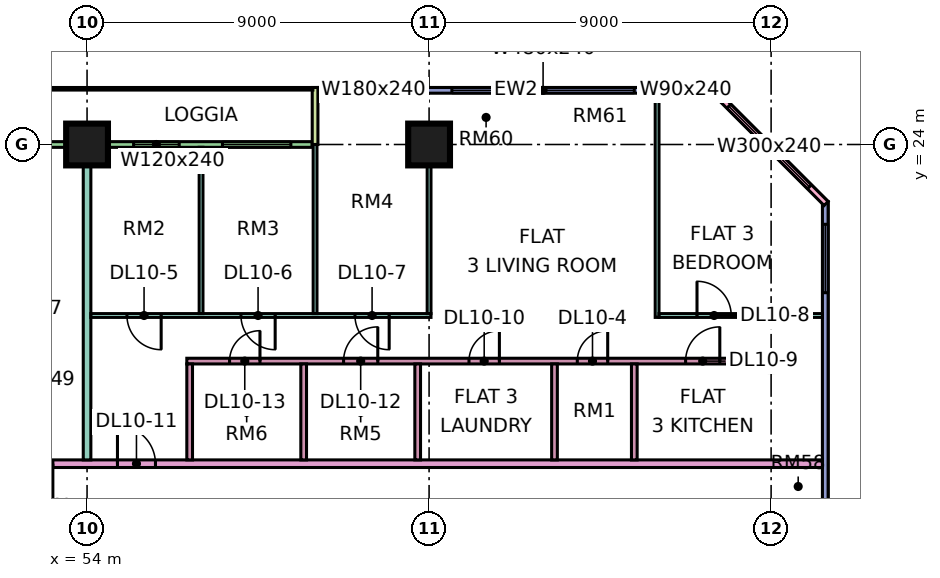
"""IFC4 building model, lengths in metres.
Left out: names, types, materials, properties, quantities, classifications, styles, units other than length and angle.
Written with IfcOpenShell. Run it as: python <this file> out.ifc"""

import sys

from ifc_helpers import new_model, si_unit, direction, frame, frame_2d, origin, origin_2d, place, context, subcontext, project, spatial, rectangle, extrude, element, fill, save


model = new_model("IFC4")
c1 = context("Model", 3, precision=1e-05, world=origin(), true_north=direction((0.0, 1.0)))
c2 = subcontext(c1, "Body", "Model", "MODEL_VIEW")
j1 = project(units=[si_unit("LENGTHUNIT", "METRE"), si_unit("PLANEANGLEUNIT", "RADIAN")], contexts=[c1])
p1 = place(None, origin())
s1 = spatial("IfcSite", under=j1, at=p1, CompositionType="ELEMENT")
p2 = place(p1, origin())
s2 = spatial("IfcBuilding", under=s1, at=p2, CompositionType="ELEMENT")
p3 = place(p2, frame((0.0, 0.0, 52.65)))
s3 = spatial("IfcBuildingStorey", under=s2, at=p3, CompositionType="ELEMENT", Elevation=52.65)
for number, where, z_axis, x_axis in (
    (1, (54.0, 24.0, 0.0), (0.0, 0.0, 1.0), (1.0, 0.0, 0.0)),
    (2, (63.0, 24.0, 0.0), (0.0, 0.0, 1.0), (1.0, 0.0, 0.0)),
):
    element("IfcColumn", number, at=place(p3, frame(where, z_axis=z_axis, x_axis=x_axis)), inside=s3, PredefinedType="COLUMN", context=c2, shape_type="SweptSolid", body=[
        extrude(rectangle(XDim=1.1, YDim=1.1, at=origin_2d()), origin(), (0.0, 0.0, 1.0), 3.75),
    ])
p4 = place(p3, frame((70.5, 25.425, 0.0), z_axis=(0.0, 0.0, 1.0), x_axis=(-1.0, 0.0, 0.0)))
e3 = element("IfcWall", 3, at=p4, inside=s3, PredefinedType="SOLIDWALL", context=c2, shape_type="SweptSolid", body=[
    extrude(rectangle(XDim=10.425, YDim=0.15, at=frame_2d((5.212, 0.0))), origin(), (0.0, 0.0, 1.0), 3.35),
])
p5 = place(p4, frame((0.3, 0.0, 0.45)))
e4 = element("IfcOpeningElement", 4, at=p5, cuts=e3, PredefinedType="OPENING", context=c2, shape_type="SweptSolid", body=[
    extrude(rectangle(XDim=0.9, YDim=2.4, at=frame_2d((0.45, 1.2))), frame((0.0, 0.085, 0.0), z_axis=(0.0, -1.0, 0.0), x_axis=(1.0, 0.0, 0.0)), (0.0, 0.0, 1.0), 0.17),
])
p6 = place(p4, frame((2.1, 0.0, 0.45)))
e5 = element("IfcOpeningElement", 5, at=p6, cuts=e3, PredefinedType="OPENING", context=c2, shape_type="SweptSolid", body=[
    extrude(rectangle(XDim=4.8, YDim=2.4, at=frame_2d((2.4, 1.2))), frame((0.0, 0.085, 0.0), z_axis=(0.0, -1.0, 0.0), x_axis=(1.0, 0.0, 0.0)), (0.0, 0.0, 1.0), 0.17),
])
p7 = place(p4, frame((8.062, 0.0, 0.45)))
e6 = element("IfcOpeningElement", 6, at=p7, cuts=e3, PredefinedType="OPENING", context=c2, shape_type="SweptSolid", body=[
    extrude(rectangle(XDim=1.8, YDim=2.4, at=frame_2d((0.9, 1.2))), frame((0.0, 0.085, 0.0), z_axis=(0.0, -1.0, 0.0), x_axis=(1.0, 0.0, 0.0)), (0.0, 0.0, 1.0), 0.17),
])
p8 = place(p3, frame((59.925, 24.0, 0.0), z_axis=(0.0, 0.0, 1.0), x_axis=(-1.0, 0.0, 0.0)))
e7 = element("IfcWall", 7, at=p8, inside=s3, PredefinedType="SOLIDWALL", context=c2, shape_type="SweptSolid", body=[
    extrude(rectangle(XDim=11.85, YDim=0.15, at=frame_2d((5.925, 0.0))), origin(), (0.0, 0.0, 1.0), 3.35),
])
p9 = place(p8, frame((0.562, 0.0, 0.45)))
e8 = element("IfcOpeningElement", 8, at=p9, cuts=e7, PredefinedType="OPENING", context=c2, shape_type="SweptSolid", body=[
    extrude(rectangle(XDim=1.8, YDim=2.4, at=frame_2d((0.9, 1.2))), frame((0.0, 0.085, 0.0), z_axis=(0.0, -1.0, 0.0), x_axis=(1.0, 0.0, 0.0)), (0.0, 0.0, 1.0), 0.17),
])
p10 = place(p8, frame((3.5, 0.0, 0.45)))
e9 = element("IfcOpeningElement", 9, at=p10, cuts=e7, PredefinedType="OPENING", context=c2, shape_type="SweptSolid", body=[
    extrude(rectangle(XDim=1.2, YDim=2.4, at=frame_2d((0.6, 1.2))), frame((0.0, 0.085, 0.0), z_axis=(0.0, -1.0, 0.0), x_axis=(1.0, 0.0, 0.0)), (0.0, 0.0, 1.0), 0.17),
])
p11 = place(p8, frame((7.113, 0.0, 0.45)))
e10 = element("IfcOpeningElement", 10, at=p11, cuts=e7, PredefinedType="OPENING", context=c2, shape_type="SweptSolid", body=[
    extrude(rectangle(XDim=4.2, YDim=2.4, at=frame_2d((2.1, 1.2))), frame((0.0, 0.085, 0.0), z_axis=(0.0, -1.0, 0.0), x_axis=(1.0, 0.0, 0.0)), (0.0, 0.0, 1.0), 0.17),
])
p12 = place(p3, frame((60.0, 25.5, 0.0), z_axis=(0.0, 0.0, 1.0), x_axis=(0.0, -1.0, 0.0)))
e11 = element("IfcWall", 11, at=p12, inside=s3, PredefinedType="SOLIDWALL", context=c2, shape_type="SweptSolid", body=[
    extrude(rectangle(XDim=1.5, YDim=0.15, at=frame_2d((0.75, 0.0))), origin(), (0.0, 0.0, 1.0), 3.35),
])
p13 = place(p3, frame((73.425, 12.075, 0.0), z_axis=(0.0, 0.0, 1.0), x_axis=(0.0, 1.0, 0.0)))
e12 = element("IfcWall", 12, at=p13, inside=s3, PredefinedType="SOLIDWALL", context=c2, shape_type="SweptSolid", body=[
    extrude(rectangle(XDim=10.425, YDim=0.15, at=frame_2d((5.212, 0.0))), origin(), (0.0, 0.0, 1.0), 3.35),
])
p14 = place(p13, frame((8.025, 0.0, 0.45)))
e13 = element("IfcOpeningElement", 13, at=p14, cuts=e12, PredefinedType="OPENING", context=c2, shape_type="SweptSolid", body=[
    extrude(rectangle(XDim=1.8, YDim=2.4, at=frame_2d((0.9, 1.2))), frame((0.0, 0.085, 0.0), z_axis=(0.0, -1.0, 0.0), x_axis=(1.0, 0.0, 0.0)), (0.0, 0.0, 1.0), 0.17),
])
p15 = place(p3, frame((73.447, 22.447, 0.0), z_axis=(0.0, 0.0, 1.0), x_axis=(-0.707106781187, 0.707106781187, 0.0)))
e14 = element("IfcWall", 14, at=p15, inside=s3, PredefinedType="SOLIDWALL", context=c2, shape_type="SweptSolid", body=[
    extrude(rectangle(XDim=4.243, YDim=0.15, at=frame_2d((2.121, 0.0))), origin(), (0.0, 0.0, 1.0), 3.35),
])
p16 = place(p15, frame((0.621, 0.0, 0.45)))
e15 = element("IfcOpeningElement", 15, at=p16, cuts=e14, PredefinedType="OPENING", context=c2, shape_type="SweptSolid", body=[
    extrude(rectangle(XDim=3.0, YDim=2.4, at=frame_2d((1.5, 1.2))), frame((0.0, 0.085, 0.0), z_axis=(0.0, -1.0, 0.0), x_axis=(1.0, 0.0, 0.0)), (0.0, 0.0, 1.0), 0.17),
])
p17 = place(p3, frame((51.225, 15.6, 0.0), z_axis=(0.0, 0.0, 1.0), x_axis=(1.0, 0.0, 0.0)))
e16 = element("IfcWall", 16, at=p17, inside=s3, PredefinedType="PARTITIONING", context=c2, shape_type="SweptSolid", body=[
    extrude(rectangle(XDim=22.125, YDim=0.2, at=frame_2d((11.062, 0.0))), origin(), (0.0, 0.0, 1.0), 3.35),
])
p18 = place(p17, frame((3.575, 0.0, 0.0)))
e17 = element("IfcOpeningElement", 17, at=p18, cuts=e16, PredefinedType="OPENING", context=c2, shape_type="SweptSolid", body=[
    extrude(rectangle(XDim=1.0, YDim=2.1, at=frame_2d((0.5, 1.05))), frame((0.0, 0.11, 0.0), z_axis=(0.0, -1.0, 0.0), x_axis=(1.0, 0.0, 0.0)), (0.0, 0.0, 1.0), 0.22),
])
p19 = place(p17, frame((0.875, 0.0, 0.0)))
e18 = element("IfcOpeningElement", 18, at=p19, cuts=e16, PredefinedType="OPENING", context=c2, shape_type="SweptSolid", body=[
    extrude(rectangle(XDim=1.0, YDim=2.1, at=frame_2d((0.5, 1.05))), frame((0.0, 0.11, 0.0), z_axis=(0.0, -1.0, 0.0), x_axis=(1.0, 0.0, 0.0)), (0.0, 0.0, 1.0), 0.22),
])
p20 = place(p3, frame((54.0, 15.7, 0.0), z_axis=(0.0, 0.0, 1.0), x_axis=(0.0, 1.0, 0.0)))
e19 = element("IfcWall", 19, at=p20, inside=s3, PredefinedType="PARTITIONING", context=c2, shape_type="SweptSolid", body=[
    extrude(rectangle(XDim=8.226, YDim=0.2, at=frame_2d((4.113, 0.0))), origin(), (0.0, 0.0, 1.0), 3.35),
])
p21 = place(p3, frame((54.1, 19.5, 0.0), z_axis=(0.0, 0.0, 1.0), x_axis=(1.0, 0.0, 0.0)))
e20 = element("IfcWall", 20, at=p21, inside=s3, PredefinedType="PARTITIONING", context=c2, shape_type="SweptSolid", body=[
    extrude(rectangle(XDim=8.95, YDim=0.1, at=frame_2d((4.475, 0.0))), origin(), (0.0, 0.0, 1.0), 3.35),
])
p22 = place(p21, frame((0.95, 0.0, 0.0)))
e21 = element("IfcOpeningElement", 21, at=p22, cuts=e20, PredefinedType="OPENING", context=c2, shape_type="SweptSolid", body=[
    extrude(rectangle(XDim=0.9, YDim=2.1, at=frame_2d((0.45, 1.05))), frame((0.0, 0.06, 0.0), z_axis=(0.0, -1.0, 0.0), x_axis=(1.0, 0.0, 0.0)), (0.0, 0.0, 1.0), 0.12),
])
p23 = place(p21, frame((3.95, 0.0, 0.0)))
e22 = element("IfcOpeningElement", 22, at=p23, cuts=e20, PredefinedType="OPENING", context=c2, shape_type="SweptSolid", body=[
    extrude(rectangle(XDim=0.9, YDim=2.1, at=frame_2d((0.45, 1.05))), frame((0.0, 0.06, 0.0), z_axis=(0.0, -1.0, 0.0), x_axis=(1.0, 0.0, 0.0)), (0.0, 0.0, 1.0), 0.12),
])
p24 = place(p21, frame((6.95, 0.0, 0.0)))
e23 = element("IfcOpeningElement", 23, at=p24, cuts=e20, PredefinedType="OPENING", context=c2, shape_type="SweptSolid", body=[
    extrude(rectangle(XDim=0.9, YDim=2.1, at=frame_2d((0.45, 1.05))), frame((0.0, 0.06, 0.0), z_axis=(0.0, -1.0, 0.0), x_axis=(1.0, 0.0, 0.0)), (0.0, 0.0, 1.0), 0.12),
])
p25 = place(p3, frame((56.625, 18.3, 0.0), z_axis=(0.0, 0.0, 1.0), x_axis=(1.0, 0.0, 0.0)))
e24 = element("IfcWall", 24, at=p25, inside=s3, PredefinedType="PARTITIONING", context=c2, shape_type="SweptSolid", body=[
    extrude(rectangle(XDim=15.425, YDim=0.15, at=frame_2d((7.712, 0.0))), origin(), (0.0, 0.0, 1.0), 3.35),
])
p26 = place(p25, frame((10.275, 0.0, 0.0)))
e25 = element("IfcOpeningElement", 25, at=p26, cuts=e24, PredefinedType="OPENING", context=c2, shape_type="SweptSolid", body=[
    extrude(rectangle(XDim=0.8, YDim=2.1, at=frame_2d((0.4, 1.05))), frame((0.0, 0.085, 0.0), z_axis=(0.0, -1.0, 0.0), x_axis=(1.0, 0.0, 0.0)), (0.0, 0.0, 1.0), 0.17),
])
p27 = place(p25, frame((13.125, 0.0, 0.0)))
e26 = element("IfcOpeningElement", 26, at=p27, cuts=e24, PredefinedType="OPENING", context=c2, shape_type="SweptSolid", body=[
    extrude(rectangle(XDim=0.9, YDim=2.1, at=frame_2d((0.45, 1.05))), frame((0.0, 0.085, 0.0), z_axis=(0.0, -1.0, 0.0), x_axis=(1.0, 0.0, 0.0)), (0.0, 0.0, 1.0), 0.17),
])
p28 = place(p25, frame((7.425, 0.0, 0.0)))
e27 = element("IfcOpeningElement", 27, at=p28, cuts=e24, PredefinedType="OPENING", context=c2, shape_type="SweptSolid", body=[
    extrude(rectangle(XDim=0.8, YDim=2.1, at=frame_2d((0.4, 1.05))), frame((0.0, 0.085, 0.0), z_axis=(0.0, -1.0, 0.0), x_axis=(1.0, 0.0, 0.0)), (0.0, 0.0, 1.0), 0.17),
])
p29 = place(p25, frame((4.125, 0.0, 0.0)))
e28 = element("IfcOpeningElement", 28, at=p29, cuts=e24, PredefinedType="OPENING", context=c2, shape_type="SweptSolid", body=[
    extrude(rectangle(XDim=0.9, YDim=2.1, at=frame_2d((0.45, 1.05))), frame((0.0, 0.085, 0.0), z_axis=(0.0, -1.0, 0.0), x_axis=(1.0, 0.0, 0.0)), (0.0, 0.0, 1.0), 0.17),
])
p30 = place(p25, frame((1.125, 0.0, 0.0)))
e29 = element("IfcOpeningElement", 29, at=p30, cuts=e24, PredefinedType="OPENING", context=c2, shape_type="SweptSolid", body=[
    extrude(rectangle(XDim=0.8, YDim=2.1, at=frame_2d((0.4, 1.05))), frame((0.0, 0.085, 0.0), z_axis=(0.0, -1.0, 0.0), x_axis=(1.0, 0.0, 0.0)), (0.0, 0.0, 1.0), 0.17),
])
p31 = place(p3, frame((56.7, 15.7, 0.0), z_axis=(0.0, 0.0, 1.0), x_axis=(0.0, 1.0, 0.0)))
e30 = element("IfcWall", 30, at=p31, inside=s3, PredefinedType="PARTITIONING", context=c2, shape_type="SweptSolid", body=[
    extrude(rectangle(XDim=2.525, YDim=0.15, at=frame_2d((1.263, 0.0))), origin(), (0.0, 0.0, 1.0), 3.35),
])
p32 = place(p3, frame((57.0, 19.55, 0.0), z_axis=(0.0, 0.0, 1.0), x_axis=(0.0, 1.0, 0.0)))
e31 = element("IfcWall", 31, at=p32, inside=s3, PredefinedType="PARTITIONING", context=c2, shape_type="SweptSolid", body=[
    extrude(rectangle(XDim=4.376, YDim=0.1, at=frame_2d((2.188, 0.0))), origin(), (0.0, 0.0, 1.0), 3.35),
])
p33 = place(p3, frame((59.7, 15.7, 0.0), z_axis=(0.0, 0.0, 1.0), x_axis=(0.0, 1.0, 0.0)))
e32 = element("IfcWall", 32, at=p33, inside=s3, PredefinedType="PARTITIONING", context=c2, shape_type="SweptSolid", body=[
    extrude(rectangle(XDim=2.525, YDim=0.15, at=frame_2d((1.263, 0.0))), origin(), (0.0, 0.0, 1.0), 3.35),
])
p34 = place(p3, frame((60.0, 19.55, 0.0), z_axis=(0.0, 0.0, 1.0), x_axis=(0.0, 1.0, 0.0)))
e33 = element("IfcWall", 33, at=p34, inside=s3, PredefinedType="PARTITIONING", context=c2, shape_type="SweptSolid", body=[
    extrude(rectangle(XDim=4.45, YDim=0.1, at=frame_2d((2.225, 0.0))), origin(), (0.0, 0.0, 1.0), 3.35),
])
p35 = place(p3, frame((62.7, 15.7, 0.0), z_axis=(0.0, 0.0, 1.0), x_axis=(0.0, 1.0, 0.0)))
e34 = element("IfcWall", 34, at=p35, inside=s3, PredefinedType="PARTITIONING", context=c2, shape_type="SweptSolid", body=[
    extrude(rectangle(XDim=2.525, YDim=0.15, at=frame_2d((1.263, 0.0))), origin(), (0.0, 0.0, 1.0), 3.35),
])
p36 = place(p3, frame((63.0, 19.55, 0.0), z_axis=(0.0, 0.0, 1.0), x_axis=(0.0, 1.0, 0.0)))
e35 = element("IfcWall", 35, at=p36, inside=s3, PredefinedType="PARTITIONING", context=c2, shape_type="SweptSolid", body=[
    extrude(rectangle(XDim=4.45, YDim=0.1, at=frame_2d((2.225, 0.0))), origin(), (0.0, 0.0, 1.0), 3.35),
])
for number, where, z_axis, x_axis in (
    (36, (66.3, 15.7, 0.0), (0.0, 0.0, 1.0), (0.0, 1.0, 0.0)),
    (37, (68.4, 15.7, 0.0), (0.0, 0.0, 1.0), (0.0, 1.0, 0.0)),
):
    element("IfcWall", number, at=place(p3, frame(where, z_axis=z_axis, x_axis=x_axis)), inside=s3, PredefinedType="PARTITIONING", context=c2, shape_type="SweptSolid", body=[
        extrude(rectangle(XDim=2.525, YDim=0.15, at=frame_2d((1.263, 0.0))), origin(), (0.0, 0.0, 1.0), 3.35),
    ])
p37 = place(p3, frame((69.0, 19.45, 0.0), z_axis=(0.0, 0.0, 1.0), x_axis=(0.0, 1.0, 0.0)))
e38 = element("IfcWall", 38, at=p37, inside=s3, PredefinedType="PARTITIONING", context=c2, shape_type="SweptSolid", body=[
    extrude(rectangle(XDim=5.9, YDim=0.1, at=frame_2d((2.95, 0.0))), origin(), (0.0, 0.0, 1.0), 3.35),
])
p38 = place(p3, frame((69.05, 19.5, 0.0), z_axis=(0.0, 0.0, 1.0), x_axis=(1.0, 0.0, 0.0)))
e39 = element("IfcWall", 39, at=p38, inside=s3, PredefinedType="PARTITIONING", context=c2, shape_type="SweptSolid", body=[
    extrude(rectangle(XDim=4.301, YDim=0.1, at=frame_2d((2.15, 0.0))), origin(), (0.0, 0.0, 1.0), 3.35),
])
p39 = place(p38, frame((1.0, 0.0, 0.0)))
e40 = element("IfcOpeningElement", 40, at=p39, cuts=e39, PredefinedType="OPENING", context=c2, shape_type="SweptSolid", body=[
    extrude(rectangle(XDim=0.9, YDim=2.1, at=frame_2d((0.45, 1.05))), frame((0.0, 0.06, 0.0), z_axis=(0.0, -1.0, 0.0), x_axis=(1.0, 0.0, 0.0)), (0.0, 0.0, 1.0), 0.12),
])
p40 = place(p3, frame((72.0, 18.0, 0.0), z_axis=(0.0, 0.0, 1.0), x_axis=(0.0, 1.0, 0.0)))
e41 = element("IfcWall", 41, at=p40, inside=s3, PredefinedType="PARTITIONING", context=c2, shape_type="SweptSolid", body=[
    extrude(rectangle(XDim=0.225, YDim=0.1, at=frame_2d((0.113, 0.0))), origin(), (0.0, 0.0, 1.0), 3.35),
])
p41 = place(p5, origin())
e42 = element("IfcWindow", 42, at=p41, inside=s3, PartitioningType="SINGLE_PANEL", PredefinedType="WINDOW", context=c2, shape_type="SweptSolid", body=[
    extrude(rectangle(XDim=0.9, YDim=2.4, at=frame_2d((0.45, 1.2))), frame((0.0, 0.03, 0.0), z_axis=(0.0, -1.0, 0.0), x_axis=(1.0, 0.0, 0.0)), (0.0, 0.0, 1.0), 0.06),
])
fill(e4, e42)
p42 = place(p6, origin())
e43 = element("IfcWindow", 43, at=p42, inside=s3, PartitioningType="SINGLE_PANEL", PredefinedType="WINDOW", context=c2, shape_type="SweptSolid", body=[
    extrude(rectangle(XDim=4.8, YDim=2.4, at=frame_2d((2.4, 1.2))), frame((0.0, 0.03, 0.0), z_axis=(0.0, -1.0, 0.0), x_axis=(1.0, 0.0, 0.0)), (0.0, 0.0, 1.0), 0.06),
])
fill(e5, e43)
p43 = place(p7, origin())
e44 = element("IfcWindow", 44, at=p43, inside=s3, PartitioningType="SINGLE_PANEL", PredefinedType="WINDOW", context=c2, shape_type="SweptSolid", body=[
    extrude(rectangle(XDim=1.8, YDim=2.4, at=frame_2d((0.9, 1.2))), frame((0.0, 0.03, 0.0), z_axis=(0.0, -1.0, 0.0), x_axis=(1.0, 0.0, 0.0)), (0.0, 0.0, 1.0), 0.06),
])
fill(e6, e44)
p44 = place(p9, origin())
e45 = element("IfcWindow", 45, at=p44, inside=s3, PartitioningType="SINGLE_PANEL", PredefinedType="WINDOW", context=c2, shape_type="SweptSolid", body=[
    extrude(rectangle(XDim=1.8, YDim=2.4, at=frame_2d((0.9, 1.2))), frame((0.0, 0.03, 0.0), z_axis=(0.0, -1.0, 0.0), x_axis=(1.0, 0.0, 0.0)), (0.0, 0.0, 1.0), 0.06),
])
fill(e8, e45)
p45 = place(p10, origin())
e46 = element("IfcWindow", 46, at=p45, inside=s3, PartitioningType="SINGLE_PANEL", PredefinedType="WINDOW", context=c2, shape_type="SweptSolid", body=[
    extrude(rectangle(XDim=1.2, YDim=2.4, at=frame_2d((0.6, 1.2))), frame((0.0, 0.03, 0.0), z_axis=(0.0, -1.0, 0.0), x_axis=(1.0, 0.0, 0.0)), (0.0, 0.0, 1.0), 0.06),
])
fill(e9, e46)
p46 = place(p14, origin())
e47 = element("IfcWindow", 47, at=p46, inside=s3, PartitioningType="SINGLE_PANEL", PredefinedType="WINDOW", context=c2, shape_type="SweptSolid", body=[
    extrude(rectangle(XDim=1.8, YDim=2.4, at=frame_2d((0.9, 1.2))), frame((0.0, 0.03, 0.0), z_axis=(0.0, -1.0, 0.0), x_axis=(1.0, 0.0, 0.0)), (0.0, 0.0, 1.0), 0.06),
])
fill(e13, e47)
p47 = place(p16, origin())
e48 = element("IfcWindow", 48, at=p47, inside=s3, PartitioningType="SINGLE_PANEL", PredefinedType="WINDOW", context=c2, shape_type="SweptSolid", body=[
    extrude(rectangle(XDim=3.0, YDim=2.4, at=frame_2d((1.5, 1.2))), frame((0.0, 0.03, 0.0), z_axis=(0.0, -1.0, 0.0), x_axis=(1.0, 0.0, 0.0)), (0.0, 0.0, 1.0), 0.06),
])
fill(e15, e48)
p48 = place(p26, frame((0.8, 0.0, 0.0), z_axis=(0.0, 0.0, 1.0), x_axis=(-1.0, 0.0, 0.0)))
e49 = element("IfcDoor", 49, at=p48, inside=s3, OperationType="SINGLE_SWING_RIGHT", PredefinedType="DOOR", context=c2, shape_type="SweptSolid", body=[
    extrude(rectangle(XDim=0.8, YDim=2.1, at=frame_2d((0.4, 1.05))), frame((0.0, 0.025, 0.0), z_axis=(0.0, -1.0, 0.0), x_axis=(1.0, 0.0, 0.0)), (0.0, 0.0, 1.0), 0.05),
])
fill(e25, e49)
p49 = place(p22, origin())
e50 = element("IfcDoor", 50, at=p49, inside=s3, OperationType="SINGLE_SWING_RIGHT", PredefinedType="DOOR", context=c2, shape_type="SweptSolid", body=[
    extrude(rectangle(XDim=0.9, YDim=2.1, at=frame_2d((0.45, 1.05))), frame((0.0, 0.025, 0.0), z_axis=(0.0, -1.0, 0.0), x_axis=(1.0, 0.0, 0.0)), (0.0, 0.0, 1.0), 0.05),
])
fill(e21, e50)
p50 = place(p23, origin())
e51 = element("IfcDoor", 51, at=p50, inside=s3, OperationType="SINGLE_SWING_RIGHT", PredefinedType="DOOR", context=c2, shape_type="SweptSolid", body=[
    extrude(rectangle(XDim=0.9, YDim=2.1, at=frame_2d((0.45, 1.05))), frame((0.0, 0.025, 0.0), z_axis=(0.0, -1.0, 0.0), x_axis=(1.0, 0.0, 0.0)), (0.0, 0.0, 1.0), 0.05),
])
fill(e22, e51)
p51 = place(p24, origin())
e52 = element("IfcDoor", 52, at=p51, inside=s3, OperationType="SINGLE_SWING_RIGHT", PredefinedType="DOOR", context=c2, shape_type="SweptSolid", body=[
    extrude(rectangle(XDim=0.9, YDim=2.1, at=frame_2d((0.45, 1.05))), frame((0.0, 0.025, 0.0), z_axis=(0.0, -1.0, 0.0), x_axis=(1.0, 0.0, 0.0)), (0.0, 0.0, 1.0), 0.05),
])
fill(e23, e52)
p52 = place(p39, origin())
e53 = element("IfcDoor", 53, at=p52, inside=s3, OperationType="SINGLE_SWING_LEFT", PredefinedType="DOOR", context=c2, shape_type="SweptSolid", body=[
    extrude(rectangle(XDim=0.9, YDim=2.1, at=frame_2d((0.45, 1.05))), frame((0.0, 0.025, 0.0), z_axis=(0.0, -1.0, 0.0), x_axis=(1.0, 0.0, 0.0)), (0.0, 0.0, 1.0), 0.05),
])
fill(e40, e53)
p53 = place(p27, frame((0.9, 0.0, 0.0), z_axis=(0.0, 0.0, 1.0), x_axis=(-1.0, 0.0, 0.0)))
e54 = element("IfcDoor", 54, at=p53, inside=s3, OperationType="SINGLE_SWING_RIGHT", PredefinedType="DOOR", context=c2, shape_type="SweptSolid", body=[
    extrude(rectangle(XDim=0.9, YDim=2.1, at=frame_2d((0.45, 1.05))), frame((0.0, 0.025, 0.0), z_axis=(0.0, -1.0, 0.0), x_axis=(1.0, 0.0, 0.0)), (0.0, 0.0, 1.0), 0.05),
])
fill(e26, e54)
p54 = place(p28, frame((0.8, 0.0, 0.0), z_axis=(0.0, 0.0, 1.0), x_axis=(-1.0, 0.0, 0.0)))
e55 = element("IfcDoor", 55, at=p54, inside=s3, OperationType="SINGLE_SWING_RIGHT", PredefinedType="DOOR", context=c2, shape_type="SweptSolid", body=[
    extrude(rectangle(XDim=0.8, YDim=2.1, at=frame_2d((0.4, 1.05))), frame((0.0, 0.025, 0.0), z_axis=(0.0, -1.0, 0.0), x_axis=(1.0, 0.0, 0.0)), (0.0, 0.0, 1.0), 0.05),
])
fill(e27, e55)
p55 = place(p18, origin())
e56 = element("IfcDoor", 56, at=p55, inside=s3, OperationType="SINGLE_SWING_LEFT", PredefinedType="DOOR", context=c2, shape_type="SweptSolid", body=[
    extrude(rectangle(XDim=1.0, YDim=2.1, at=frame_2d((0.5, 1.05))), frame((0.0, 0.025, 0.0), z_axis=(0.0, -1.0, 0.0), x_axis=(1.0, 0.0, 0.0)), (0.0, 0.0, 1.0), 0.05),
])
fill(e17, e56)
p56 = place(p29, frame((0.9, 0.0, 0.0), z_axis=(0.0, 0.0, 1.0), x_axis=(-1.0, 0.0, 0.0)))
e57 = element("IfcDoor", 57, at=p56, inside=s3, OperationType="SINGLE_SWING_RIGHT", PredefinedType="DOOR", context=c2, shape_type="SweptSolid", body=[
    extrude(rectangle(XDim=0.9, YDim=2.1, at=frame_2d((0.45, 1.05))), frame((0.0, 0.025, 0.0), z_axis=(0.0, -1.0, 0.0), x_axis=(1.0, 0.0, 0.0)), (0.0, 0.0, 1.0), 0.05),
])
fill(e28, e57)
p57 = place(p30, frame((0.8, 0.0, 0.0), z_axis=(0.0, 0.0, 1.0), x_axis=(-1.0, 0.0, 0.0)))
e58 = element("IfcDoor", 58, at=p57, inside=s3, OperationType="SINGLE_SWING_RIGHT", PredefinedType="DOOR", context=c2, shape_type="SweptSolid", body=[
    extrude(rectangle(XDim=0.8, YDim=2.1, at=frame_2d((0.4, 1.05))), frame((0.0, 0.025, 0.0), z_axis=(0.0, -1.0, 0.0), x_axis=(1.0, 0.0, 0.0)), (0.0, 0.0, 1.0), 0.05),
])
fill(e29, e58)
p58 = place(p19, origin())
e59 = element("IfcDoor", 59, at=p58, inside=s3, OperationType="SINGLE_SWING_RIGHT", PredefinedType="DOOR", context=c2, shape_type="SweptSolid", body=[
    extrude(rectangle(XDim=1.0, YDim=2.1, at=frame_2d((0.5, 1.05))), frame((0.0, 0.025, 0.0), z_axis=(0.0, -1.0, 0.0), x_axis=(1.0, 0.0, 0.0)), (0.0, 0.0, 1.0), 0.05),
])
fill(e18, e59)
save(model, sys.argv[1])
